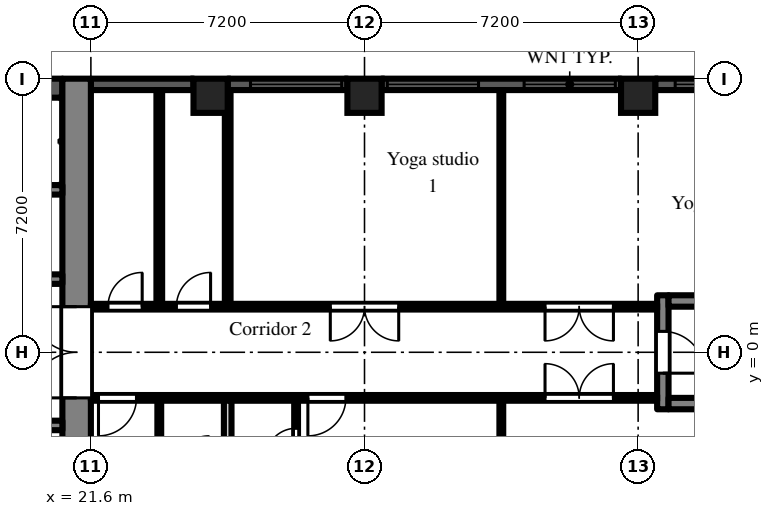
"""IFC4 building model, lengths in metres.
Left out: names, types, materials, properties, quantities, classifications, styles, units other than length and angle.
Written with IfcOpenShell. Run it as: python <this file> out.ifc"""

import sys

from ifc_helpers import new_model, si_unit, direction, frame, frame_2d, origin, origin_2d, place, context, subcontext, project, spatial, rectangle, extrude, element, fill, save


model = new_model("IFC4")
c1 = context("Model", 3, precision=1e-05, world=origin(), true_north=direction((0.0, 1.0)))
c2 = subcontext(c1, "Body", "Model", "MODEL_VIEW")
j1 = project(units=[si_unit("LENGTHUNIT", "METRE"), si_unit("PLANEANGLEUNIT", "RADIAN")], contexts=[c1])
p1 = place(None, origin())
s1 = spatial("IfcSite", under=j1, at=p1, CompositionType="ELEMENT")
p2 = place(p1, origin())
s2 = spatial("IfcBuilding", under=s1, at=p2, CompositionType="ELEMENT")
p3 = place(p2, frame((0.0, 0.0, 102.9)))
s3 = spatial("IfcBuildingStorey", under=s2, at=p3, CompositionType="ELEMENT", Elevation=102.9)
for number, where, z_axis, x_axis in (
    (1, (24.75, 6.75, 0.0), (0.0, 0.0, 1.0), (1.0, 0.0, 0.0)),
    (2, (28.8, 6.75, 0.0), (0.0, 0.0, 1.0), (1.0, 0.0, 0.0)),
    (3, (36.0, 6.75, 0.0), (0.0, 0.0, 1.0), (1.0, 0.0, 0.0)),
):
    element("IfcColumn", number, at=place(p3, frame(where, z_axis=z_axis, x_axis=x_axis)), inside=s3, PredefinedType="COLUMN", context=c2, shape_type="SweptSolid", body=[
        extrude(rectangle(XDim=0.9, YDim=0.9, at=origin_2d()), origin(), (0.0, 0.0, 1.0), 3.0),
    ])
p4 = place(p3, frame((38.7, 7.05, 0.0), z_axis=(0.0, 0.0, 1.0), x_axis=(-1.0, 0.0, 0.0)))
e4 = element("IfcWall", 4, at=p4, inside=s3, PredefinedType="SOLIDWALL", context=c2, shape_type="SweptSolid", body=[
    extrude(rectangle(XDim=2.25, YDim=0.3, at=frame_2d((1.125, 0.0))), origin(), (0.0, 0.0, 1.0), 2.1),
])
p5 = place(p4, frame((0.525, 0.0, 0.2)))
e5 = element("IfcOpeningElement", 5, at=p5, cuts=e4, PredefinedType="OPENING", context=c2, shape_type="SweptSolid", body=[
    extrude(rectangle(XDim=1.2, YDim=1.85, at=frame_2d((0.6, 0.925))), frame((0.0, 0.16, 0.0), z_axis=(0.0, -1.0, 0.0), x_axis=(1.0, 0.0, 0.0)), (0.0, 0.0, 1.0), 0.32),
])
p6 = place(p3, frame((35.55, 7.05, 0.0), z_axis=(0.0, 0.0, 1.0), x_axis=(-1.0, 0.0, 0.0)))
e6 = element("IfcWall", 6, at=p6, inside=s3, PredefinedType="SOLIDWALL", context=c2, shape_type="SweptSolid", body=[
    extrude(rectangle(XDim=6.3, YDim=0.3, at=frame_2d((3.15, 0.0))), origin(), (0.0, 0.0, 1.0), 2.1),
])
p7 = place(p6, frame((0.15, 0.0, 0.2)))
e7 = element("IfcOpeningElement", 7, at=p7, cuts=e6, PredefinedType="OPENING", context=c2, shape_type="SweptSolid", body=[
    extrude(rectangle(XDim=2.4, YDim=1.85, at=frame_2d((1.2, 0.925))), frame((0.0, 0.16, 0.0), z_axis=(0.0, -1.0, 0.0), x_axis=(1.0, 0.0, 0.0)), (0.0, 0.0, 1.0), 0.32),
])
p8 = place(p6, frame((3.75, 0.0, 0.2)))
e8 = element("IfcOpeningElement", 8, at=p8, cuts=e6, PredefinedType="OPENING", context=c2, shape_type="SweptSolid", body=[
    extrude(rectangle(XDim=2.4, YDim=1.85, at=frame_2d((1.2, 0.925))), frame((0.0, 0.16, 0.0), z_axis=(0.0, -1.0, 0.0), x_axis=(1.0, 0.0, 0.0)), (0.0, 0.0, 1.0), 0.32),
])
p9 = place(p3, frame((28.35, 7.05, 0.0), z_axis=(0.0, 0.0, 1.0), x_axis=(-1.0, 0.0, 0.0)))
e9 = element("IfcWall", 9, at=p9, inside=s3, PredefinedType="SOLIDWALL", context=c2, shape_type="SweptSolid", body=[
    extrude(rectangle(XDim=3.15, YDim=0.3, at=frame_2d((1.575, 0.0))), origin(), (0.0, 0.0, 1.0), 2.1),
])
p10 = place(p9, frame((0.15, 0.0, 0.2)))
e10 = element("IfcOpeningElement", 10, at=p10, cuts=e9, PredefinedType="OPENING", context=c2, shape_type="SweptSolid", body=[
    extrude(rectangle(XDim=2.4, YDim=1.85, at=frame_2d((1.2, 0.925))), frame((0.0, 0.16, 0.0), z_axis=(0.0, -1.0, 0.0), x_axis=(1.0, 0.0, 0.0)), (0.0, 0.0, 1.0), 0.32),
])
p11 = place(p3, frame((24.3, 7.05, 0.0), z_axis=(0.0, 0.0, 1.0), x_axis=(-1.0, 0.0, 0.0)))
e11 = element("IfcWall", 11, at=p11, inside=s3, PredefinedType="SOLIDWALL", context=c2, shape_type="SweptSolid", body=[
    extrude(rectangle(XDim=2.7, YDim=0.3, at=frame_2d((1.35, 0.0))), origin(), (0.0, 0.0, 1.0), 2.1),
])
p12 = place(p3, frame((21.225, -7.2, 0.0), z_axis=(0.0, 0.0, 1.0), x_axis=(0.0, 1.0, 0.0)))
e12 = element("IfcWall", 12, at=p12, inside=s3, PredefinedType="SHEAR", context=c2, shape_type="SweptSolid", body=[
    extrude(rectangle(XDim=14.4, YDim=0.75, at=frame_2d((7.2, 0.0))), origin(), (0.0, 0.0, 1.0), 2.575),
])
p13 = place(p12, frame((6.0, 0.0, 0.0)))
e13 = element("IfcOpeningElement", 13, at=p13, cuts=e12, PredefinedType="OPENING", context=c2, shape_type="SweptSolid", body=[
    extrude(rectangle(XDim=2.4, YDim=2.2, at=frame_2d((1.2, 1.1))), frame((0.0, 0.385, 0.0), z_axis=(0.0, -1.0, 0.0), x_axis=(1.0, 0.0, 0.0)), (0.0, 0.0, 1.0), 0.77),
])
p14 = place(p3, frame((7.9, 6.95, 0.0), z_axis=(0.0, 0.0, 1.0), x_axis=(1.0, 0.0, 0.0)))
e14 = element("IfcWall", 14, at=p14, inside=s3, PredefinedType="SHEAR", context=c2, shape_type="SweptSolid", body=[
    extrude(rectangle(XDim=12.95, YDim=0.5, at=frame_2d((6.475, 0.0))), origin(), (0.0, 0.0, 1.0), 2.575),
])
p15 = place(p3, frame((7.9, 1.925, 0.0), z_axis=(0.0, 0.0, 1.0), x_axis=(1.0, 0.0, 0.0)))
e15 = element("IfcWall", 15, at=p15, inside=s3, PredefinedType="SHEAR", context=c2, shape_type="SweptSolid", body=[
    extrude(rectangle(XDim=12.95, YDim=0.25, at=frame_2d((6.475, 0.0))), origin(), (0.0, 0.0, 1.0), 2.575),
])
p16 = place(p15, frame((0.525, 0.0, 0.0)))
e16 = element("IfcOpeningElement", 16, at=p16, cuts=e15, PredefinedType="OPENING", context=c2, shape_type="SweptSolid", body=[
    extrude(rectangle(XDim=0.9, YDim=2.1, at=frame_2d((0.45, 1.05))), frame((0.0, 0.135, 0.0), z_axis=(0.0, -1.0, 0.0), x_axis=(1.0, 0.0, 0.0)), (0.0, 0.0, 1.0), 0.27),
])
p17 = place(p15, frame((2.625, 0.0, 0.0)))
e17 = element("IfcOpeningElement", 17, at=p17, cuts=e15, PredefinedType="OPENING", context=c2, shape_type="SweptSolid", body=[
    extrude(rectangle(XDim=1.1, YDim=2.1, at=frame_2d((0.55, 1.05))), frame((0.0, 0.135, 0.0), z_axis=(0.0, -1.0, 0.0), x_axis=(1.0, 0.0, 0.0)), (0.0, 0.0, 1.0), 0.27),
])
p18 = place(p15, frame((4.925, 0.0, 0.0)))
e18 = element("IfcOpeningElement", 18, at=p18, cuts=e15, PredefinedType="OPENING", context=c2, shape_type="SweptSolid", body=[
    extrude(rectangle(XDim=0.9, YDim=2.1, at=frame_2d((0.45, 1.05))), frame((0.0, 0.135, 0.0), z_axis=(0.0, -1.0, 0.0), x_axis=(1.0, 0.0, 0.0)), (0.0, 0.0, 1.0), 0.27),
])
p19 = place(p15, frame((8.225, 0.0, 0.0)))
e19 = element("IfcOpeningElement", 19, at=p19, cuts=e15, PredefinedType="OPENING", context=c2, shape_type="SweptSolid", body=[
    extrude(rectangle(XDim=0.9, YDim=2.1, at=frame_2d((0.45, 1.05))), frame((0.0, 0.135, 0.0), z_axis=(0.0, -1.0, 0.0), x_axis=(1.0, 0.0, 0.0)), (0.0, 0.0, 1.0), 0.27),
])
p20 = place(p3, frame((12.3, 4.275, 0.0), z_axis=(0.0, 0.0, 1.0), x_axis=(1.0, 0.0, 0.0)))
e20 = element("IfcWall", 20, at=p20, inside=s3, PredefinedType="SHEAR", context=c2, shape_type="SweptSolid", body=[
    extrude(rectangle(XDim=8.55, YDim=0.25, at=frame_2d((4.275, 0.0))), origin(), (0.0, 0.0, 1.0), 2.575),
])
p21 = place(p3, frame((7.9, -1.925, 0.0), z_axis=(0.0, 0.0, 1.0), x_axis=(1.0, 0.0, 0.0)))
e21 = element("IfcWall", 21, at=p21, inside=s3, PredefinedType="SHEAR", context=c2, shape_type="SweptSolid", body=[
    extrude(rectangle(XDim=12.95, YDim=0.25, at=frame_2d((6.475, 0.0))), origin(), (0.0, 0.0, 1.0), 2.575),
])
p22 = place(p21, frame((4.825, 0.0, 0.0)))
e22 = element("IfcOpeningElement", 22, at=p22, cuts=e21, PredefinedType="OPENING", context=c2, shape_type="SweptSolid", body=[
    extrude(rectangle(XDim=1.1, YDim=2.1, at=frame_2d((0.55, 1.05))), frame((0.0, 0.135, 0.0), z_axis=(0.0, -1.0, 0.0), x_axis=(1.0, 0.0, 0.0)), (0.0, 0.0, 1.0), 0.27),
])
p23 = place(p21, frame((7.025, 0.0, 0.0)))
e23 = element("IfcOpeningElement", 23, at=p23, cuts=e21, PredefinedType="OPENING", context=c2, shape_type="SweptSolid", body=[
    extrude(rectangle(XDim=1.1, YDim=2.1, at=frame_2d((0.55, 1.05))), frame((0.0, 0.135, 0.0), z_axis=(0.0, -1.0, 0.0), x_axis=(1.0, 0.0, 0.0)), (0.0, 0.0, 1.0), 0.27),
])
p24 = place(p21, frame((9.225, 0.0, 0.0)))
e24 = element("IfcOpeningElement", 24, at=p24, cuts=e21, PredefinedType="OPENING", context=c2, shape_type="SweptSolid", body=[
    extrude(rectangle(XDim=1.1, YDim=2.1, at=frame_2d((0.55, 1.05))), frame((0.0, 0.135, 0.0), z_axis=(0.0, -1.0, 0.0), x_axis=(1.0, 0.0, 0.0)), (0.0, 0.0, 1.0), 0.27),
])
p25 = place(p21, frame((0.525, 0.0, 0.0)))
e25 = element("IfcOpeningElement", 25, at=p25, cuts=e21, PredefinedType="OPENING", context=c2, shape_type="SweptSolid", body=[
    extrude(rectangle(XDim=0.9, YDim=2.1, at=frame_2d((0.45, 1.05))), frame((0.0, 0.135, 0.0), z_axis=(0.0, -1.0, 0.0), x_axis=(1.0, 0.0, 0.0)), (0.0, 0.0, 1.0), 0.27),
])
p26 = place(p21, frame((2.625, 0.0, 0.0)))
e26 = element("IfcOpeningElement", 26, at=p26, cuts=e21, PredefinedType="OPENING", context=c2, shape_type="SweptSolid", body=[
    extrude(rectangle(XDim=1.1, YDim=2.1, at=frame_2d((0.55, 1.05))), frame((0.0, 0.135, 0.0), z_axis=(0.0, -1.0, 0.0), x_axis=(1.0, 0.0, 0.0)), (0.0, 0.0, 1.0), 0.27),
])
p27 = place(p3, frame((36.65, -1.5, 0.0), z_axis=(0.0, 0.0, 1.0), x_axis=(0.0, 1.0, 0.0)))
e27 = element("IfcWall", 27, at=p27, inside=s3, PredefinedType="SHEAR", context=c2, shape_type="SweptSolid", body=[
    extrude(rectangle(XDim=3.0, YDim=0.3, at=frame_2d((1.5, 0.0))), origin(), (0.0, 0.0, 1.0), 2.575),
])
p28 = place(p27, frame((0.95, 0.0, 0.0)))
e28 = element("IfcOpeningElement", 28, at=p28, cuts=e27, PredefinedType="OPENING", context=c2, shape_type="SweptSolid", body=[
    extrude(rectangle(XDim=1.1, YDim=2.1, at=frame_2d((0.55, 1.05))), frame((0.0, 0.16, 0.0), z_axis=(0.0, -1.0, 0.0), x_axis=(1.0, 0.0, 0.0)), (0.0, 0.0, 1.0), 0.32),
])
for number, where, z_axis, x_axis in (
    (29, (36.8, -1.35, 0.0), (0.0, 0.0, 1.0), (1.0, 0.0, 0.0)),
    (30, (36.8, 1.35, 0.0), (0.0, 0.0, 1.0), (1.0, 0.0, 0.0)),
):
    element("IfcWall", number, at=place(p3, frame(where, z_axis=z_axis, x_axis=x_axis)), inside=s3, PredefinedType="SHEAR", context=c2, shape_type="SweptSolid", body=[
        extrude(rectangle(XDim=5.8, YDim=0.3, at=frame_2d((2.9, 0.0))), origin(), (0.0, 0.0, 1.0), 2.575),
    ])
p29 = place(p3, frame((21.6, -1.2, 0.0), z_axis=(0.0, 0.0, 1.0), x_axis=(1.0, 0.0, 0.0)))
e31 = element("IfcWall", 31, at=p29, inside=s3, PredefinedType="PARTITIONING", context=c2, shape_type="SweptSolid", body=[
    extrude(rectangle(XDim=14.9, YDim=0.15, at=frame_2d((7.45, 0.0))), origin(), (0.0, 0.0, 1.0), 2.575),
])
p30 = place(p29, frame((0.2, 0.0, 0.0)))
e32 = element("IfcOpeningElement", 32, at=p30, cuts=e31, PredefinedType="OPENING", context=c2, shape_type="SweptSolid", body=[
    extrude(rectangle(XDim=1.0, YDim=2.1, at=frame_2d((0.5, 1.05))), frame((0.0, 0.085, 0.0), z_axis=(0.0, -1.0, 0.0), x_axis=(1.0, 0.0, 0.0)), (0.0, 0.0, 1.0), 0.17),
])
p31 = place(p29, frame((5.71, 0.0, 0.0)))
e33 = element("IfcOpeningElement", 33, at=p31, cuts=e31, PredefinedType="OPENING", context=c2, shape_type="SweptSolid", body=[
    extrude(rectangle(XDim=1.0, YDim=2.1, at=frame_2d((0.5, 1.05))), frame((0.0, 0.085, 0.0), z_axis=(0.0, -1.0, 0.0), x_axis=(1.0, 0.0, 0.0)), (0.0, 0.0, 1.0), 0.17),
])
p32 = place(p29, frame((11.95, 0.0, 0.0)))
e34 = element("IfcOpeningElement", 34, at=p32, cuts=e31, PredefinedType="OPENING", context=c2, shape_type="SweptSolid", body=[
    extrude(rectangle(XDim=1.8, YDim=2.1, at=frame_2d((0.9, 1.05))), frame((0.0, 0.085, 0.0), z_axis=(0.0, -1.0, 0.0), x_axis=(1.0, 0.0, 0.0)), (0.0, 0.0, 1.0), 0.17),
])
p33 = place(p3, frame((21.6, 1.2, 0.0), z_axis=(0.0, 0.0, 1.0), x_axis=(1.0, 0.0, 0.0)))
e35 = element("IfcWall", 35, at=p33, inside=s3, PredefinedType="PARTITIONING", context=c2, shape_type="SweptSolid", body=[
    extrude(rectangle(XDim=14.9, YDim=0.15, at=frame_2d((7.45, 0.0))), origin(), (0.0, 0.0, 1.0), 2.575),
])
p34 = place(p33, frame((0.45, 0.0, 0.0)))
e36 = element("IfcOpeningElement", 36, at=p34, cuts=e35, PredefinedType="OPENING", context=c2, shape_type="SweptSolid", body=[
    extrude(rectangle(XDim=0.9, YDim=2.1, at=frame_2d((0.45, 1.05))), frame((0.0, 0.085, 0.0), z_axis=(0.0, -1.0, 0.0), x_axis=(1.0, 0.0, 0.0)), (0.0, 0.0, 1.0), 0.17),
])
p35 = place(p33, frame((2.25, 0.0, 0.0)))
e37 = element("IfcOpeningElement", 37, at=p35, cuts=e35, PredefinedType="OPENING", context=c2, shape_type="SweptSolid", body=[
    extrude(rectangle(XDim=0.9, YDim=2.1, at=frame_2d((0.45, 1.05))), frame((0.0, 0.085, 0.0), z_axis=(0.0, -1.0, 0.0), x_axis=(1.0, 0.0, 0.0)), (0.0, 0.0, 1.0), 0.17),
])
p36 = place(p33, frame((6.3, 0.0, 0.0)))
e38 = element("IfcOpeningElement", 38, at=p36, cuts=e35, PredefinedType="OPENING", context=c2, shape_type="SweptSolid", body=[
    extrude(rectangle(XDim=1.8, YDim=2.1, at=frame_2d((0.9, 1.05))), frame((0.0, 0.085, 0.0), z_axis=(0.0, -1.0, 0.0), x_axis=(1.0, 0.0, 0.0)), (0.0, 0.0, 1.0), 0.17),
])
p37 = place(p33, frame((11.95, 0.0, 0.0)))
e39 = element("IfcOpeningElement", 39, at=p37, cuts=e35, PredefinedType="OPENING", context=c2, shape_type="SweptSolid", body=[
    extrude(rectangle(XDim=1.8, YDim=2.1, at=frame_2d((0.9, 1.05))), frame((0.0, 0.085, 0.0), z_axis=(0.0, -1.0, 0.0), x_axis=(1.0, 0.0, 0.0)), (0.0, 0.0, 1.0), 0.17),
])
p38 = place(p3, frame((23.4, -3.05, 0.0), z_axis=(0.0, 0.0, 1.0), x_axis=(0.0, 1.0, 0.0)))
e40 = element("IfcWall", 40, at=p38, inside=s3, PredefinedType="PARTITIONING", context=c2, shape_type="SweptSolid", body=[
    extrude(rectangle(XDim=1.775, YDim=0.1, at=frame_2d((0.888, 0.0))), origin(), (0.0, 0.0, 1.0), 2.575),
])
p39 = place(p3, frame((23.4, 1.275, 0.0), z_axis=(0.0, 0.0, 1.0), x_axis=(0.0, 1.0, 0.0)))
e41 = element("IfcWall", 41, at=p39, inside=s3, PredefinedType="PARTITIONING", context=c2, shape_type="SweptSolid", body=[
    extrude(rectangle(XDim=5.625, YDim=0.15, at=frame_2d((2.812, 0.0))), origin(), (0.0, 0.0, 1.0), 2.575),
])
p40 = place(p3, frame((25.2, -6.9, 0.0), z_axis=(0.0, 0.0, 1.0), x_axis=(0.0, 1.0, 0.0)))
e42 = element("IfcWall", 42, at=p40, inside=s3, PredefinedType="PARTITIONING", context=c2, shape_type="SweptSolid", body=[
    extrude(rectangle(XDim=5.625, YDim=0.2, at=frame_2d((2.812, 0.0))), origin(), (0.0, 0.0, 1.0), 2.575),
])
p41 = place(p3, frame((25.2, 1.275, 0.0), z_axis=(0.0, 0.0, 1.0), x_axis=(0.0, 1.0, 0.0)))
e43 = element("IfcWall", 43, at=p41, inside=s3, PredefinedType="PARTITIONING", context=c2, shape_type="SweptSolid", body=[
    extrude(rectangle(XDim=5.625, YDim=0.15, at=frame_2d((2.812, 0.0))), origin(), (0.0, 0.0, 1.0), 2.575),
])
p42 = place(p3, frame((27.0, -3.55, 0.0), z_axis=(0.0, 0.0, 1.0), x_axis=(0.0, 1.0, 0.0)))
e44 = element("IfcWall", 44, at=p42, inside=s3, PredefinedType="PARTITIONING", context=c2, shape_type="SweptSolid", body=[
    extrude(rectangle(XDim=2.275, YDim=0.1, at=frame_2d((1.138, 0.0))), origin(), (0.0, 0.0, 1.0), 2.575),
])
p43 = place(p42, frame((0.75, 0.0, 0.0)))
e45 = element("IfcOpeningElement", 45, at=p43, cuts=e44, PredefinedType="OPENING", context=c2, shape_type="SweptSolid", body=[
    extrude(rectangle(XDim=0.8, YDim=2.1, at=frame_2d((0.4, 1.05))), frame((0.0, 0.06, 0.0), z_axis=(0.0, -1.0, 0.0), x_axis=(1.0, 0.0, 0.0)), (0.0, 0.0, 1.0), 0.12),
])
for number, where, z_axis, x_axis in (
    (46, (32.4, -6.9, 0.0), (0.0, 0.0, 1.0), (0.0, 1.0, 0.0)),
    (47, (32.4, 1.275, 0.0), (0.0, 0.0, 1.0), (0.0, 1.0, 0.0)),
):
    element("IfcWall", number, at=place(p3, frame(where, z_axis=z_axis, x_axis=x_axis)), inside=s3, PredefinedType="PARTITIONING", context=c2, shape_type="SweptSolid", body=[
        extrude(rectangle(XDim=5.625, YDim=0.1, at=frame_2d((2.812, 0.0))), origin(), (0.0, 0.0, 1.0), 2.575),
    ])
p44 = place(p5, origin())
e48 = element("IfcWindow", 48, at=p44, inside=s3, PartitioningType="SINGLE_PANEL", PredefinedType="WINDOW", context=c2, shape_type="SweptSolid", body=[
    extrude(rectangle(XDim=1.2, YDim=1.85, at=frame_2d((0.6, 0.925))), frame((0.0, 0.03, 0.0), z_axis=(0.0, -1.0, 0.0), x_axis=(1.0, 0.0, 0.0)), (0.0, 0.0, 1.0), 0.06),
])
fill(e5, e48)
p45 = place(p7, origin())
e49 = element("IfcWindow", 49, at=p45, inside=s3, PartitioningType="SINGLE_PANEL", PredefinedType="WINDOW", context=c2, shape_type="SweptSolid", body=[
    extrude(rectangle(XDim=2.4, YDim=1.85, at=frame_2d((1.2, 0.925))), frame((0.0, 0.03, 0.0), z_axis=(0.0, -1.0, 0.0), x_axis=(1.0, 0.0, 0.0)), (0.0, 0.0, 1.0), 0.06),
])
fill(e7, e49)
p46 = place(p8, origin())
e50 = element("IfcWindow", 50, at=p46, inside=s3, PartitioningType="SINGLE_PANEL", PredefinedType="WINDOW", context=c2, shape_type="SweptSolid", body=[
    extrude(rectangle(XDim=2.4, YDim=1.85, at=frame_2d((1.2, 0.925))), frame((0.0, 0.03, 0.0), z_axis=(0.0, -1.0, 0.0), x_axis=(1.0, 0.0, 0.0)), (0.0, 0.0, 1.0), 0.06),
])
fill(e8, e50)
p47 = place(p10, origin())
e51 = element("IfcWindow", 51, at=p47, inside=s3, PartitioningType="SINGLE_PANEL", PredefinedType="WINDOW", context=c2, shape_type="SweptSolid", body=[
    extrude(rectangle(XDim=2.4, YDim=1.85, at=frame_2d((1.2, 0.925))), frame((0.0, 0.03, 0.0), z_axis=(0.0, -1.0, 0.0), x_axis=(1.0, 0.0, 0.0)), (0.0, 0.0, 1.0), 0.06),
])
fill(e10, e51)
p48 = place(p13, origin())
e52 = element("IfcDoor", 52, at=p48, inside=s3, OperationType="DOUBLE_DOOR_DOUBLE_SWING", PredefinedType="DOOR", context=c2, shape_type="SweptSolid", body=[
    extrude(rectangle(XDim=2.4, YDim=2.2, at=frame_2d((1.2, 1.1))), frame((0.0, 0.025, 0.0), z_axis=(0.0, -1.0, 0.0), x_axis=(1.0, 0.0, 0.0)), (0.0, 0.0, 1.0), 0.05),
])
fill(e13, e52)
p49 = place(p28, frame((1.1, 0.0, 0.0), z_axis=(0.0, 0.0, 1.0), x_axis=(-1.0, 0.0, 0.0)))
e53 = element("IfcDoor", 53, at=p49, inside=s3, OperationType="SINGLE_SWING_RIGHT", PredefinedType="DOOR", context=c2, shape_type="SweptSolid", body=[
    extrude(rectangle(XDim=1.1, YDim=2.1, at=frame_2d((0.55, 1.05))), frame((0.0, 0.025, 0.0), z_axis=(0.0, -1.0, 0.0), x_axis=(1.0, 0.0, 0.0)), (0.0, 0.0, 1.0), 0.05),
])
fill(e28, e53)
p50 = place(p34, origin())
e54 = element("IfcDoor", 54, at=p50, inside=s3, OperationType="SINGLE_SWING_RIGHT", PredefinedType="DOOR", context=c2, shape_type="SweptSolid", body=[
    extrude(rectangle(XDim=0.9, YDim=2.1, at=frame_2d((0.45, 1.05))), frame((0.0, 0.025, 0.0), z_axis=(0.0, -1.0, 0.0), x_axis=(1.0, 0.0, 0.0)), (0.0, 0.0, 1.0), 0.05),
])
fill(e36, e54)
p51 = place(p35, origin())
e55 = element("IfcDoor", 55, at=p51, inside=s3, OperationType="SINGLE_SWING_RIGHT", PredefinedType="DOOR", context=c2, shape_type="SweptSolid", body=[
    extrude(rectangle(XDim=0.9, YDim=2.1, at=frame_2d((0.45, 1.05))), frame((0.0, 0.025, 0.0), z_axis=(0.0, -1.0, 0.0), x_axis=(1.0, 0.0, 0.0)), (0.0, 0.0, 1.0), 0.05),
])
fill(e37, e55)
p52 = place(p36, frame((1.8, 0.0, 0.0), z_axis=(0.0, 0.0, 1.0), x_axis=(-1.0, 0.0, 0.0)))
e56 = element("IfcDoor", 56, at=p52, inside=s3, OperationType="DOUBLE_DOOR_DOUBLE_SWING", PredefinedType="DOOR", context=c2, shape_type="SweptSolid", body=[
    extrude(rectangle(XDim=1.8, YDim=2.1, at=frame_2d((0.9, 1.05))), frame((0.0, 0.025, 0.0), z_axis=(0.0, -1.0, 0.0), x_axis=(1.0, 0.0, 0.0)), (0.0, 0.0, 1.0), 0.05),
])
fill(e38, e56)
p53 = place(p37, frame((1.8, 0.0, 0.0), z_axis=(0.0, 0.0, 1.0), x_axis=(-1.0, 0.0, 0.0)))
e57 = element("IfcDoor", 57, at=p53, inside=s3, OperationType="DOUBLE_DOOR_DOUBLE_SWING", PredefinedType="DOOR", context=c2, shape_type="SweptSolid", body=[
    extrude(rectangle(XDim=1.8, YDim=2.1, at=frame_2d((0.9, 1.05))), frame((0.0, 0.025, 0.0), z_axis=(0.0, -1.0, 0.0), x_axis=(1.0, 0.0, 0.0)), (0.0, 0.0, 1.0), 0.05),
])
fill(e39, e57)
p54 = place(p30, frame((1.0, 0.0, 0.0), z_axis=(0.0, 0.0, 1.0), x_axis=(-1.0, 0.0, 0.0)))
e58 = element("IfcDoor", 58, at=p54, inside=s3, OperationType="SINGLE_SWING_RIGHT", PredefinedType="DOOR", context=c2, shape_type="SweptSolid", body=[
    extrude(rectangle(XDim=1.0, YDim=2.1, at=frame_2d((0.5, 1.05))), frame((0.0, 0.025, 0.0), z_axis=(0.0, -1.0, 0.0), x_axis=(1.0, 0.0, 0.0)), (0.0, 0.0, 1.0), 0.05),
])
fill(e32, e58)
p55 = place(p43, origin())
e59 = element("IfcDoor", 59, at=p55, inside=s3, OperationType="SINGLE_SWING_LEFT", PredefinedType="DOOR", context=c2, shape_type="SweptSolid", body=[
    extrude(rectangle(XDim=0.8, YDim=2.1, at=frame_2d((0.4, 1.05))), frame((0.0, 0.025, 0.0), z_axis=(0.0, -1.0, 0.0), x_axis=(1.0, 0.0, 0.0)), (0.0, 0.0, 1.0), 0.05),
])
fill(e45, e59)
p56 = place(p31, frame((1.0, 0.0, 0.0), z_axis=(0.0, 0.0, 1.0), x_axis=(-1.0, 0.0, 0.0)))
e60 = element("IfcDoor", 60, at=p56, inside=s3, OperationType="SINGLE_SWING_RIGHT", PredefinedType="DOOR", context=c2, shape_type="SweptSolid", body=[
    extrude(rectangle(XDim=1.0, YDim=2.1, at=frame_2d((0.5, 1.05))), frame((0.0, 0.025, 0.0), z_axis=(0.0, -1.0, 0.0), x_axis=(1.0, 0.0, 0.0)), (0.0, 0.0, 1.0), 0.05),
])
fill(e33, e60)
p57 = place(p32, origin())
e61 = element("IfcDoor", 61, at=p57, inside=s3, OperationType="DOUBLE_DOOR_DOUBLE_SWING", PredefinedType="DOOR", context=c2, shape_type="SweptSolid", body=[
    extrude(rectangle(XDim=1.8, YDim=2.1, at=frame_2d((0.9, 1.05))), frame((0.0, 0.025, 0.0), z_axis=(0.0, -1.0, 0.0), x_axis=(1.0, 0.0, 0.0)), (0.0, 0.0, 1.0), 0.05),
])
fill(e34, e61)
save(model, sys.argv[1])
